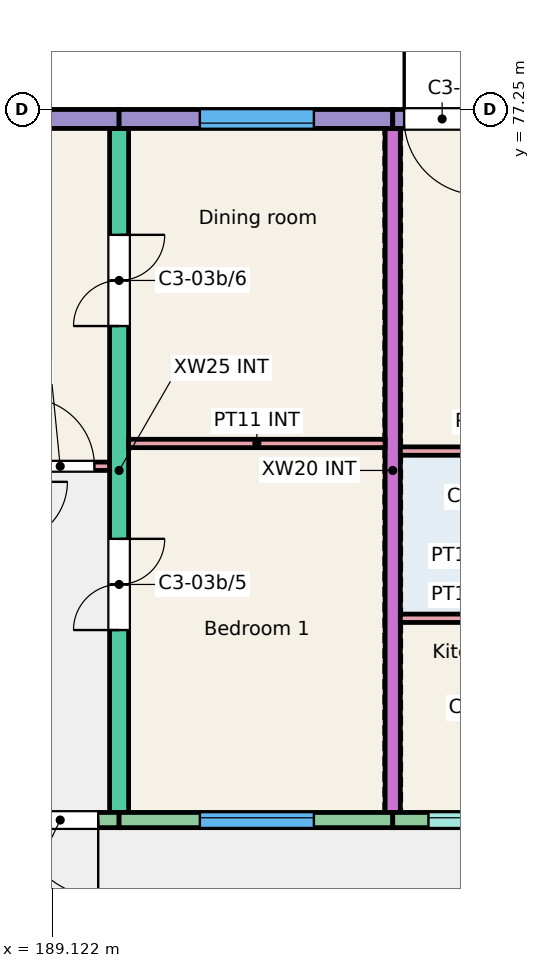
"""IFC4 building model, lengths in metres.
Left out: names, types, materials, properties, quantities, classifications, styles, units other than length and angle.
Written with IfcOpenShell. Run it as: python <this file> out.ifc"""

import sys

from ifc_helpers import new_model, si_unit, direction, frame, frame_2d, origin, place, context, subcontext, project, spatial, rectangle, extrude, element, fill, save


model = new_model("IFC4")
c1 = context("Model", 3, precision=1e-05, world=origin(), true_north=direction((0.0, 1.0)))
c2 = subcontext(c1, "Body", "Model", "MODEL_VIEW")
j1 = project(units=[si_unit("LENGTHUNIT", "METRE"), si_unit("PLANEANGLEUNIT", "RADIAN")], contexts=[c1])
p1 = place(None, origin())
s1 = spatial("IfcSite", under=j1, at=p1, CompositionType="ELEMENT")
p2 = place(p1, origin())
s2 = spatial("IfcBuilding", under=s1, at=p2, CompositionType="ELEMENT")
p3 = place(p2, frame((0.0, 0.0, 9.0)))
s3 = spatial("IfcBuildingStorey", under=s2, at=p3, CompositionType="ELEMENT", Elevation=9.0)
p4 = place(p3, frame((190.0, 68.0, 0.0), z_axis=(0.0, 0.0, 1.0), x_axis=(0.0, 1.0, 0.0)))
e1 = element("IfcWall", 1, at=p4, inside=s3, PredefinedType="SHEAR", context=c2, shape_type="SweptSolid", body=[
    extrude(rectangle(XDim=9.0, YDim=0.25, at=frame_2d((4.5, 0.0))), origin(), (0.0, 0.0, 1.0), 3.0),
])
p5 = place(p4, frame((2.4, 0.0, 0.0)))
e2 = element("IfcOpeningElement", 2, at=p5, cuts=e1, PredefinedType="OPENING", context=c2, shape_type="SweptSolid", body=[
    extrude(rectangle(XDim=1.2, YDim=2.1, at=frame_2d((0.6, 1.05))), frame((0.0, 0.135, 0.0), z_axis=(0.0, -1.0, 0.0), x_axis=(1.0, 0.0, 0.0)), (0.0, 0.0, 1.0), 0.27),
])
p6 = place(p4, frame((6.4, 0.0, 0.0)))
e3 = element("IfcOpeningElement", 3, at=p6, cuts=e1, PredefinedType="OPENING", context=c2, shape_type="SweptSolid", body=[
    extrude(rectangle(XDim=1.2, YDim=2.1, at=frame_2d((0.6, 1.05))), frame((0.0, 0.135, 0.0), z_axis=(0.0, -1.0, 0.0), x_axis=(1.0, 0.0, 0.0)), (0.0, 0.0, 1.0), 0.27),
])
p7 = place(p3, frame((193.6, 68.0, 0.0), z_axis=(0.0, 0.0, 1.0), x_axis=(0.0, 1.0, 0.0)))
e4 = element("IfcWall", 4, at=p7, inside=s3, PredefinedType="SHEAR", context=c2, shape_type="SweptSolid", body=[
    extrude(rectangle(XDim=9.0, YDim=0.2, at=frame_2d((4.5, 0.0))), origin(), (0.0, 0.0, 1.0), 3.0),
])
p8 = place(p3, frame((186.4, 77.125, 0.0), z_axis=(0.0, 0.0, 1.0), x_axis=(1.0, 0.0, 0.0)))
e5 = element("IfcWall", 5, at=p8, inside=s3, PredefinedType="SOLIDWALL", context=c2, shape_type="SweptSolid", body=[
    extrude(rectangle(XDim=3.6, YDim=0.25, at=frame_2d((1.8, 0.0))), origin(), (0.0, 0.0, 1.0), 3.0),
])
p9 = place(p8, frame((1.05, 0.0, 0.9)))
e6 = element("IfcOpeningElement", 6, at=p9, cuts=e5, PredefinedType="OPENING", context=c2, shape_type="SweptSolid", body=[
    extrude(rectangle(XDim=1.5, YDim=1.5, at=frame_2d((0.75, 0.75))), frame((0.0, 0.135, 0.0), z_axis=(0.0, -1.0, 0.0), x_axis=(1.0, 0.0, 0.0)), (0.0, 0.0, 1.0), 0.27),
])
p10 = place(p3, frame((186.4, 67.9, 0.0), z_axis=(0.0, 0.0, 1.0), x_axis=(1.0, 0.0, 0.0)))
e7 = element("IfcWall", 7, at=p10, inside=s3, PredefinedType="SOLIDWALL", context=c2, shape_type="SweptSolid", body=[
    extrude(rectangle(XDim=3.6, YDim=0.2, at=frame_2d((1.8, 0.0))), origin(), (0.0, 0.0, 1.0), 3.0),
])
p11 = place(p10, frame((0.495, 0.0, 1.1)))
e8 = element("IfcOpeningElement", 8, at=p11, cuts=e7, PredefinedType="OPENING", context=c2, shape_type="SweptSolid", body=[
    extrude(rectangle(XDim=1.2, YDim=1.3, at=frame_2d((0.6, 0.65))), frame((0.0, 0.11, 0.0), z_axis=(0.0, -1.0, 0.0), x_axis=(1.0, 0.0, 0.0)), (0.0, 0.0, 1.0), 0.22),
])
p12 = place(p10, frame((2.325, 0.0, 0.0)))
e9 = element("IfcOpeningElement", 9, at=p12, cuts=e7, PredefinedType="OPENING", context=c2, shape_type="SweptSolid", body=[
    extrude(rectangle(XDim=1.0, YDim=2.1, at=frame_2d((0.5, 1.05))), frame((0.0, 0.11, 0.0), z_axis=(0.0, -1.0, 0.0), x_axis=(1.0, 0.0, 0.0)), (0.0, 0.0, 1.0), 0.22),
])
p13 = place(p3, frame((190.0, 77.125, 0.0), z_axis=(0.0, 0.0, 1.0), x_axis=(1.0, 0.0, 0.0)))
e10 = element("IfcWall", 10, at=p13, inside=s3, PredefinedType="SOLIDWALL", context=c2, shape_type="SweptSolid", body=[
    extrude(rectangle(XDim=3.6, YDim=0.25, at=frame_2d((1.8, 0.0))), origin(), (0.0, 0.0, 1.0), 3.0),
])
p14 = place(p13, frame((1.062, 0.0, 0.9)))
e11 = element("IfcOpeningElement", 11, at=p14, cuts=e10, PredefinedType="OPENING", context=c2, shape_type="SweptSolid", body=[
    extrude(rectangle(XDim=1.5, YDim=1.5, at=frame_2d((0.75, 0.75))), frame((0.0, 0.135, 0.0), z_axis=(0.0, -1.0, 0.0), x_axis=(1.0, 0.0, 0.0)), (0.0, 0.0, 1.0), 0.27),
])
p15 = place(p3, frame((190.0, 67.9, 0.0), z_axis=(0.0, 0.0, 1.0), x_axis=(1.0, 0.0, 0.0)))
e12 = element("IfcWall", 12, at=p15, inside=s3, PredefinedType="SOLIDWALL", context=c2, shape_type="SweptSolid", body=[
    extrude(rectangle(XDim=3.6, YDim=0.2, at=frame_2d((1.8, 0.0))), origin(), (0.0, 0.0, 1.0), 3.0),
])
p16 = place(p15, frame((1.062, 0.0, 0.9)))
e13 = element("IfcOpeningElement", 13, at=p16, cuts=e12, PredefinedType="OPENING", context=c2, shape_type="SweptSolid", body=[
    extrude(rectangle(XDim=1.5, YDim=1.5, at=frame_2d((0.75, 0.75))), frame((0.0, 0.11, 0.0), z_axis=(0.0, -1.0, 0.0), x_axis=(1.0, 0.0, 0.0)), (0.0, 0.0, 1.0), 0.22),
])
p17 = place(p3, frame((193.6, 77.125, 0.0), z_axis=(0.0, 0.0, 1.0), x_axis=(1.0, 0.0, 0.0)))
e14 = element("IfcWall", 14, at=p17, inside=s3, PredefinedType="SOLIDWALL", context=c2, shape_type="SweptSolid", body=[
    extrude(rectangle(XDim=3.6, YDim=0.25, at=frame_2d((1.8, 0.0))), origin(), (0.0, 0.0, 1.0), 3.0),
])
p18 = place(p17, frame((1.6, 0.0, 0.9)))
e15 = element("IfcOpeningElement", 15, at=p18, cuts=e14, PredefinedType="OPENING", context=c2, shape_type="SweptSolid", body=[
    extrude(rectangle(XDim=1.5, YDim=1.5, at=frame_2d((0.75, 0.75))), frame((0.0, 0.135, 0.0), z_axis=(0.0, -1.0, 0.0), x_axis=(1.0, 0.0, 0.0)), (0.0, 0.0, 1.0), 0.27),
])
p19 = place(p17, frame((0.15, 0.0, 0.0)))
e16 = element("IfcOpeningElement", 16, at=p19, cuts=e14, PredefinedType="OPENING", context=c2, shape_type="SweptSolid", body=[
    extrude(rectangle(XDim=1.0, YDim=2.1, at=frame_2d((0.5, 1.05))), frame((0.0, 0.135, 0.0), z_axis=(0.0, -1.0, 0.0), x_axis=(1.0, 0.0, 0.0)), (0.0, 0.0, 1.0), 0.27),
])
p20 = place(p3, frame((193.6, 67.9, 0.0), z_axis=(0.0, 0.0, 1.0), x_axis=(1.0, 0.0, 0.0)))
e17 = element("IfcWall", 17, at=p20, inside=s3, PredefinedType="SOLIDWALL", context=c2, shape_type="SweptSolid", body=[
    extrude(rectangle(XDim=3.45, YDim=0.2, at=frame_2d((1.725, 0.0))), origin(), (0.0, 0.0, 1.0), 3.0),
])
p21 = place(p20, frame((0.47, 0.0, 1.1)))
e18 = element("IfcOpeningElement", 18, at=p21, cuts=e17, PredefinedType="OPENING", context=c2, shape_type="SweptSolid", body=[
    extrude(rectangle(XDim=1.2, YDim=1.3, at=frame_2d((0.6, 0.65))), frame((0.0, 0.11, 0.0), z_axis=(0.0, -1.0, 0.0), x_axis=(1.0, 0.0, 0.0)), (0.0, 0.0, 1.0), 0.22),
])
p22 = place(p20, frame((2.3, 0.0, 0.0)))
e19 = element("IfcOpeningElement", 19, at=p22, cuts=e17, PredefinedType="OPENING", context=c2, shape_type="SweptSolid", body=[
    extrude(rectangle(XDim=1.0, YDim=2.1, at=frame_2d((0.5, 1.05))), frame((0.0, 0.11, 0.0), z_axis=(0.0, -1.0, 0.0), x_axis=(1.0, 0.0, 0.0)), (0.0, 0.0, 1.0), 0.22),
])
p23 = place(p3, frame((193.7, 70.555, 0.0), z_axis=(0.0, 0.0, 1.0), x_axis=(1.0, 0.0, 0.0)))
e20 = element("IfcWall", 20, at=p23, inside=s3, PredefinedType="PARTITIONING", context=c2, shape_type="SweptSolid", body=[
    extrude(rectangle(XDim=1.94, YDim=0.11, at=frame_2d((0.97, 0.0))), origin(), (0.0, 0.0, 1.0), 2.8),
])
p24 = place(p3, frame((193.7, 72.755, 0.0), z_axis=(0.0, 0.0, 1.0), x_axis=(1.0, 0.0, 0.0)))
e21 = element("IfcWall", 21, at=p24, inside=s3, PredefinedType="PARTITIONING", context=c2, shape_type="SweptSolid", body=[
    extrude(rectangle(XDim=3.35, YDim=0.11, at=frame_2d((1.675, 0.0))), origin(), (0.0, 0.0, 1.0), 2.8),
])
p25 = place(p24, frame((2.25, 0.0, 0.0)))
e22 = element("IfcOpeningElement", 22, at=p25, cuts=e21, PredefinedType="OPENING", context=c2, shape_type="SweptSolid", body=[
    extrude(rectangle(XDim=0.9, YDim=2.1, at=frame_2d((0.45, 1.05))), frame((0.0, 0.065, 0.0), z_axis=(0.0, -1.0, 0.0), x_axis=(1.0, 0.0, 0.0)), (0.0, 0.0, 1.0), 0.13),
])
p26 = place(p3, frame((186.525, 72.555, 0.0), z_axis=(0.0, 0.0, 1.0), x_axis=(1.0, 0.0, 0.0)))
e23 = element("IfcWall", 23, at=p26, inside=s3, PredefinedType="PARTITIONING", context=c2, shape_type="SweptSolid", body=[
    extrude(rectangle(XDim=3.35, YDim=0.11, at=frame_2d((1.675, 0.0))), origin(), (0.0, 0.0, 1.0), 2.8),
])
p27 = place(p26, frame((2.25, 0.0, 0.0)))
e24 = element("IfcOpeningElement", 24, at=p27, cuts=e23, PredefinedType="OPENING", context=c2, shape_type="SweptSolid", body=[
    extrude(rectangle(XDim=0.9, YDim=2.1, at=frame_2d((0.45, 1.05))), frame((0.0, 0.065, 0.0), z_axis=(0.0, -1.0, 0.0), x_axis=(1.0, 0.0, 0.0)), (0.0, 0.0, 1.0), 0.13),
])
p28 = place(p3, frame((190.125, 72.855, 0.0), z_axis=(0.0, 0.0, 1.0), x_axis=(1.0, 0.0, 0.0)))
e25 = element("IfcWall", 25, at=p28, inside=s3, PredefinedType="PARTITIONING", context=c2, shape_type="SweptSolid", body=[
    extrude(rectangle(XDim=3.375, YDim=0.11, at=frame_2d((1.688, 0.0))), origin(), (0.0, 0.0, 1.0), 2.8),
])
p29 = place(p21, origin())
e26 = element("IfcWindow", 26, at=p29, inside=s3, PartitioningType="SINGLE_PANEL", PredefinedType="WINDOW", context=c2, shape_type="SweptSolid", body=[
    extrude(rectangle(XDim=1.2, YDim=1.3, at=frame_2d((0.6, 0.65))), frame((0.0, 0.06, 0.0), z_axis=(0.0, -1.0, 0.0), x_axis=(1.0, 0.0, 0.0)), (0.0, 0.0, 1.0), 0.06),
])
fill(e18, e26)
p30 = place(p16, origin())
e27 = element("IfcWindow", 27, at=p30, inside=s3, PartitioningType="SINGLE_PANEL", PredefinedType="WINDOW", context=c2, shape_type="SweptSolid", body=[
    extrude(rectangle(XDim=1.5, YDim=1.5, at=frame_2d((0.75, 0.75))), frame((0.0, 0.06, 0.0), z_axis=(0.0, -1.0, 0.0), x_axis=(1.0, 0.0, 0.0)), (0.0, 0.0, 1.0), 0.06),
])
fill(e13, e27)
p31 = place(p14, origin())
e28 = element("IfcWindow", 28, at=p31, inside=s3, PartitioningType="SINGLE_PANEL", PredefinedType="WINDOW", context=c2, shape_type="SweptSolid", body=[
    extrude(rectangle(XDim=1.5, YDim=1.5, at=frame_2d((0.75, 0.75))), frame((0.0, -0.025, 0.0), z_axis=(0.0, -1.0, 0.0), x_axis=(1.0, 0.0, 0.0)), (0.0, 0.0, 1.0), 0.06),
])
fill(e11, e28)
p32 = place(p19, origin())
e29 = element("IfcDoor", 29, at=p32, inside=s3, OperationType="SINGLE_SWING_RIGHT", PredefinedType="DOOR", context=c2, shape_type="SweptSolid", body=[
    extrude(rectangle(XDim=1.0, YDim=2.1, at=frame_2d((0.5, 1.05))), frame((0.0, 0.025, 0.0), z_axis=(0.0, -1.0, 0.0), x_axis=(1.0, 0.0, 0.0)), (0.0, 0.0, 1.0), 0.05),
])
fill(e16, e29)
p33 = place(p12, origin())
e30 = element("IfcDoor", 30, at=p33, inside=s3, OperationType="SINGLE_SWING_RIGHT", PredefinedType="DOOR", context=c2, shape_type="SweptSolid", body=[
    extrude(rectangle(XDim=1.0, YDim=2.1, at=frame_2d((0.5, 1.05))), frame((0.0, 0.025, 0.0), z_axis=(0.0, -1.0, 0.0), x_axis=(1.0, 0.0, 0.0)), (0.0, 0.0, 1.0), 0.05),
])
fill(e9, e30)
p34 = place(p27, origin())
e31 = element("IfcDoor", 31, at=p34, inside=s3, OperationType="SINGLE_SWING_LEFT", PredefinedType="DOOR", context=c2, shape_type="SweptSolid", body=[
    extrude(rectangle(XDim=0.9, YDim=2.1, at=frame_2d((0.45, 1.05))), frame((0.0, 0.025, 0.0), z_axis=(0.0, -1.0, 0.0), x_axis=(1.0, 0.0, 0.0)), (0.0, 0.0, 1.0), 0.05),
])
fill(e24, e31)
p35 = place(p5, origin())
e32 = element("IfcDoor", 32, at=p35, inside=s3, OperationType="DOUBLE_DOOR_SINGLE_SWING", PredefinedType="DOOR", context=c2, shape_type="SweptSolid", body=[
    extrude(rectangle(XDim=1.2, YDim=2.1, at=frame_2d((0.6, 1.05))), frame((0.0, 0.025, 0.0), z_axis=(0.0, -1.0, 0.0), x_axis=(1.0, 0.0, 0.0)), (0.0, 0.0, 1.0), 0.05),
])
fill(e2, e32)
p36 = place(p6, origin())
e33 = element("IfcDoor", 33, at=p36, inside=s3, OperationType="DOUBLE_DOOR_SINGLE_SWING", PredefinedType="DOOR", context=c2, shape_type="SweptSolid", body=[
    extrude(rectangle(XDim=1.2, YDim=2.1, at=frame_2d((0.6, 1.05))), frame((0.0, 0.025, 0.0), z_axis=(0.0, -1.0, 0.0), x_axis=(1.0, 0.0, 0.0)), (0.0, 0.0, 1.0), 0.05),
])
fill(e3, e33)
save(model, sys.argv[1])
